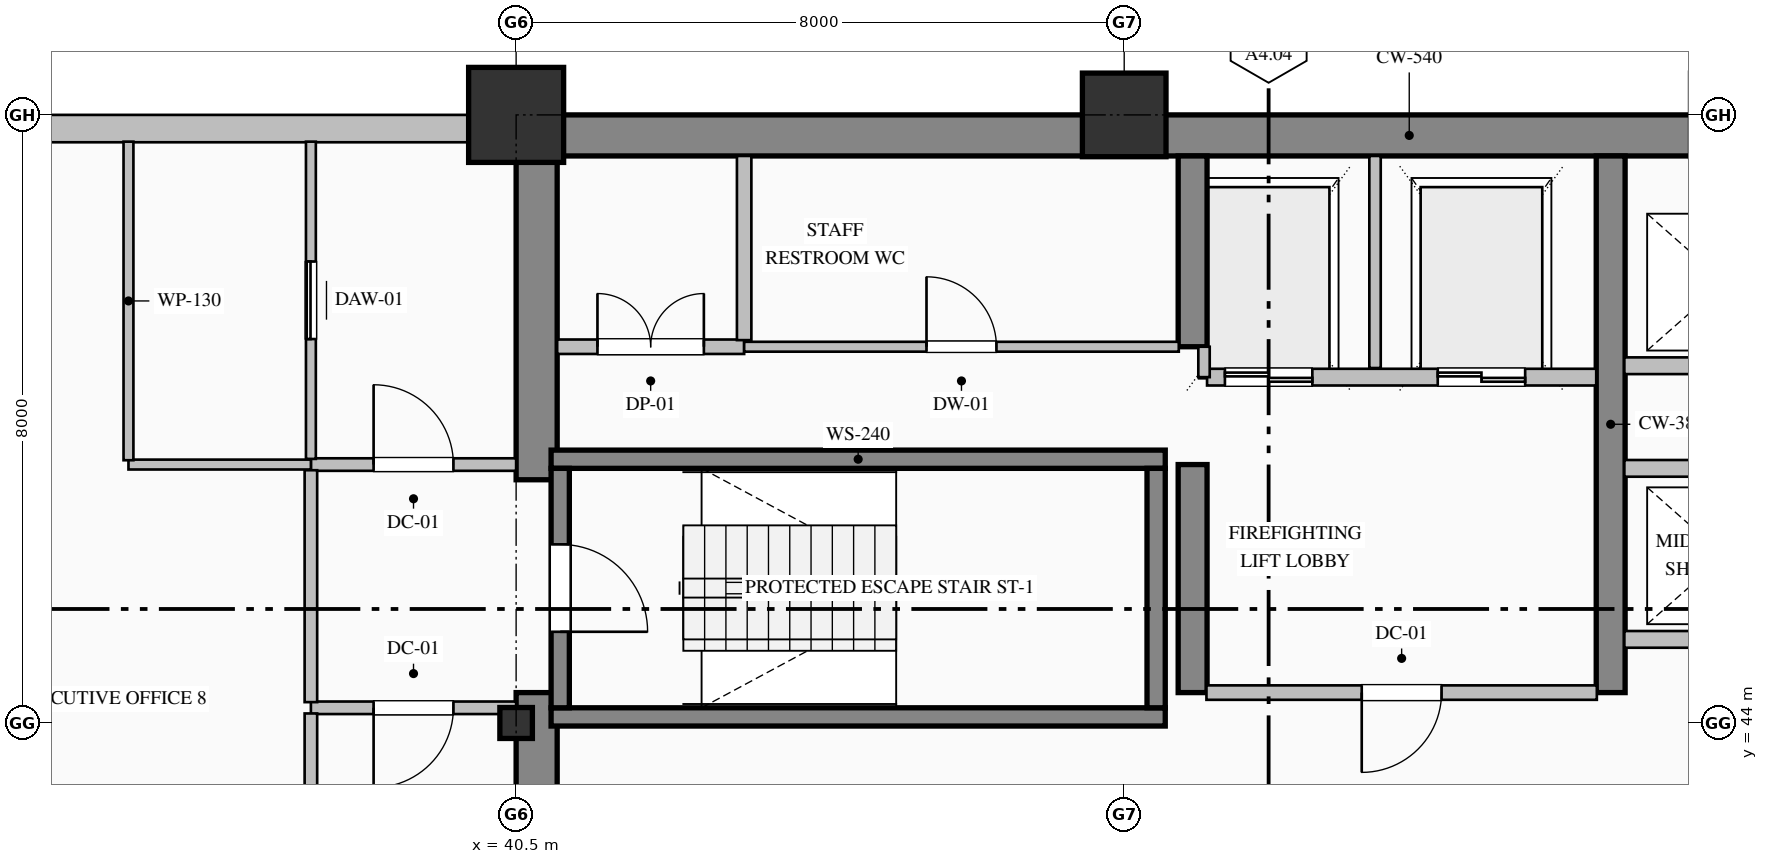
"""IFC4 building model, lengths in metres.
Left out: names, types, materials, properties, quantities, classifications, styles, units other than length and angle.
Written with IfcOpenShell. Run it as: python <this file> out.ifc"""

import sys

from ifc_helpers import new_model, si_unit, direction, frame, frame_2d, origin, origin_2d, place, context, subcontext, project, spatial, rectangle, hollow_rectangle, i_section, extrude, element, fill, save


model = new_model("IFC4")
c1 = context("Model", 3, precision=1e-05, world=origin(), true_north=direction((0.0, 1.0)))
c2 = subcontext(c1, "Body", "Model", "MODEL_VIEW")
j1 = project(units=[si_unit("LENGTHUNIT", "METRE"), si_unit("PLANEANGLEUNIT", "RADIAN")], contexts=[c1])
p1 = place(None, origin())
s1 = spatial("IfcSite", under=j1, at=p1, CompositionType="ELEMENT")
p2 = place(p1, origin())
s2 = spatial("IfcBuilding", under=s1, at=p2, CompositionType="ELEMENT")
p3 = place(p2, frame((0.0, 0.0, 32.2)))
s3 = spatial("IfcBuildingStorey", under=s2, at=p3, CompositionType="ELEMENT", Elevation=32.2)
p4 = place(p3, frame((40.5, 51.73, 0.0), z_axis=(0.0, 0.0, 1.0), x_axis=(1.0, 0.0, 0.0)))
e1 = element("IfcWall", 1, at=p4, inside=s3, PredefinedType="SHEAR", context=c2, shape_type="SweptSolid", body=[
    extrude(rectangle(XDim=23.5, YDim=0.54, at=frame_2d((11.75, 0.0))), origin(), (0.0, 0.0, 1.0), 3.75),
])
p5 = place(p3, frame((40.77, 36.54, 0.0), z_axis=(0.0, 0.0, 1.0), x_axis=(0.0, 1.0, 0.0)))
e2 = element("IfcWall", 2, at=p5, inside=s3, PredefinedType="SHEAR", context=c2, shape_type="SweptSolid", body=[
    extrude(rectangle(XDim=7.86, YDim=0.54, at=frame_2d((3.93, 0.0))), origin(), (0.0, 0.0, 1.0), 3.75),
])
p6 = place(p3, frame((40.77, 47.2, 0.0), z_axis=(0.0, 0.0, 1.0), x_axis=(0.0, 1.0, 0.0)))
e3 = element("IfcWall", 3, at=p6, inside=s3, PredefinedType="SHEAR", context=c2, shape_type="SweptSolid", body=[
    extrude(rectangle(XDim=4.26, YDim=0.54, at=frame_2d((2.13, 0.0))), origin(), (0.0, 0.0, 1.0), 3.75),
])
p7 = place(p3, frame((49.4, 44.4, 0.0), z_axis=(0.0, 0.0, 1.0), x_axis=(0.0, 1.0, 0.0)))
e4 = element("IfcWall", 4, at=p7, inside=s3, PredefinedType="SHEAR", context=c2, shape_type="SweptSolid", body=[
    extrude(rectangle(XDim=3.0, YDim=0.38, at=frame_2d((1.5, 0.0))), origin(), (0.0, 0.0, 1.0), 3.75),
])
p8 = place(p3, frame((49.4, 48.95, 0.0), z_axis=(0.0, 0.0, 1.0), x_axis=(0.0, 1.0, 0.0)))
e5 = element("IfcWall", 5, at=p8, inside=s3, PredefinedType="SHEAR", context=c2, shape_type="SweptSolid", body=[
    extrude(rectangle(XDim=2.51, YDim=0.38, at=frame_2d((1.255, 0.0))), origin(), (0.0, 0.0, 1.0), 3.75),
])
p9 = place(p3, frame((54.9, 44.4, 0.0), z_axis=(0.0, 0.0, 1.0), x_axis=(0.0, 1.0, 0.0)))
e6 = element("IfcWall", 6, at=p9, inside=s3, PredefinedType="SHEAR", context=c2, shape_type="SweptSolid", body=[
    extrude(rectangle(XDim=7.06, YDim=0.38, at=frame_2d((3.53, 0.0))), origin(), (0.0, 0.0, 1.0), 3.75),
])
p10 = place(p3, frame((40.5, 44.0, 0.0), z_axis=(0.0, 0.0, 1.0), x_axis=(1.0, 0.0, 0.0)))
e7 = element("IfcColumn", 7, at=p10, inside=s3, PredefinedType="COLUMN", context=c2, shape_type="SweptSolid", body=[
    extrude(i_section(OverallWidth=0.407, OverallDepth=0.428, WebThickness=0.02, FlangeThickness=0.035, FilletRadius=0.022, at=origin_2d()), origin(), (0.0, 0.0, 1.0), 4.0),
])
p11 = place(p3, frame((40.5, 52.0, 0.0), z_axis=(0.0, 0.0, 1.0), x_axis=(1.0, 0.0, 0.0)))
e8 = element("IfcColumn", 8, at=p11, inside=s3, PredefinedType="COLUMN", context=c2, shape_type="SweptSolid", body=[
    extrude(hollow_rectangle(XDim=1.25, YDim=1.25, WallThickness=0.045, at=origin_2d()), origin(), (0.0, 0.0, 1.0), 4.0),
])
p12 = place(p3, frame((48.5, 52.0, 0.0), z_axis=(0.0, 0.0, 1.0), x_axis=(1.0, 0.0, 0.0)))
e9 = element("IfcColumn", 9, at=p12, inside=s3, PredefinedType="COLUMN", context=c2, shape_type="SweptSolid", body=[
    extrude(hollow_rectangle(XDim=1.1, YDim=1.1, WallThickness=0.04, at=origin_2d()), origin(), (0.0, 0.0, 1.0), 4.0),
])
p13 = place(p3, frame((4.0, 51.82, 0.0), z_axis=(0.0, 0.0, 1.0), x_axis=(1.0, 0.0, 0.0)))
e10 = element("IfcWall", 10, at=p13, inside=s3, PredefinedType="SOLIDWALL", context=c2, shape_type="SweptSolid", body=[
    extrude(rectangle(XDim=36.52, YDim=0.36, at=frame_2d((18.26, 0.0))), origin(), (0.0, 0.0, 1.0), 3.25),
])
p14 = place(p13, frame((6.15, 0.0, 0.85)))
e11 = element("IfcOpeningElement", 11, at=p14, cuts=e10, PredefinedType="OPENING", context=c2, shape_type="SweptSolid", body=[
    extrude(rectangle(XDim=2.1, YDim=2.05, at=frame_2d((1.05, 1.025))), frame((0.0, 0.19, 0.0), z_axis=(0.0, -1.0, 0.0), x_axis=(1.0, 0.0, 0.0)), (0.0, 0.0, 1.0), 0.38),
])
p15 = place(p13, frame((13.5, 0.0, 0.85)))
e12 = element("IfcOpeningElement", 12, at=p15, cuts=e10, PredefinedType="OPENING", context=c2, shape_type="SweptSolid", body=[
    extrude(rectangle(XDim=1.8, YDim=2.05, at=frame_2d((0.9, 1.025))), frame((0.0, 0.19, 0.0), z_axis=(0.0, -1.0, 0.0), x_axis=(1.0, 0.0, 0.0)), (0.0, 0.0, 1.0), 0.38),
])
p16 = place(p13, frame((16.95, 0.0, 0.85)))
e13 = element("IfcOpeningElement", 13, at=p16, cuts=e10, PredefinedType="OPENING", context=c2, shape_type="SweptSolid", body=[
    extrude(rectangle(XDim=2.1, YDim=2.05, at=frame_2d((1.05, 1.025))), frame((0.0, 0.19, 0.0), z_axis=(0.0, -1.0, 0.0), x_axis=(1.0, 0.0, 0.0)), (0.0, 0.0, 1.0), 0.38),
])
p17 = place(p13, frame((24.3, 0.0, 0.85)))
e14 = element("IfcOpeningElement", 14, at=p17, cuts=e10, PredefinedType="OPENING", context=c2, shape_type="SweptSolid", body=[
    extrude(rectangle(XDim=1.8, YDim=2.05, at=frame_2d((0.9, 1.025))), frame((0.0, 0.19, 0.0), z_axis=(0.0, -1.0, 0.0), x_axis=(1.0, 0.0, 0.0)), (0.0, 0.0, 1.0), 0.38),
])
for number, where, z_axis, x_axis in (
    (15, (40.96, 47.47, 0.0), (0.0, 0.0, 1.0), (1.0, 0.0, 0.0)),
    (16, (49.04, 44.08, 0.0), (0.0, 0.0, 1.0), (-1.0, 0.0, 0.0)),
):
    element("IfcWall", number, at=place(p3, frame(where, z_axis=z_axis, x_axis=x_axis)), inside=s3, PredefinedType="SOLIDWALL", context=c2, shape_type="SweptSolid", body=[
        extrude(rectangle(XDim=8.08, YDim=0.24, at=frame_2d((4.04, 0.0))), origin(), (0.0, 0.0, 1.0), 4.0),
    ])
p18 = place(p3, frame((41.08, 47.35, 0.0), z_axis=(0.0, 0.0, 1.0), x_axis=(0.0, -1.0, 0.0)))
e17 = element("IfcWall", 17, at=p18, inside=s3, PredefinedType="SOLIDWALL", context=c2, shape_type="SweptSolid", body=[
    extrude(rectangle(XDim=3.15, YDim=0.24, at=frame_2d((1.575, 0.0))), origin(), (0.0, 0.0, 1.0), 4.0),
])
p19 = place(p18, frame((1.0, 0.0, 0.0)))
e18 = element("IfcOpeningElement", 18, at=p19, cuts=e17, PredefinedType="OPENING", context=c2, shape_type="SweptSolid", body=[
    extrude(rectangle(XDim=1.15, YDim=2.2, at=frame_2d((0.575, 1.1))), frame((0.0, 0.13, 0.0), z_axis=(0.0, -1.0, 0.0), x_axis=(1.0, 0.0, 0.0)), (0.0, 0.0, 1.0), 0.26),
])
p20 = place(p3, frame((48.92, 44.2, 0.0), z_axis=(0.0, 0.0, 1.0), x_axis=(0.0, 1.0, 0.0)))
e19 = element("IfcWall", 19, at=p20, inside=s3, PredefinedType="SOLIDWALL", context=c2, shape_type="SweptSolid", body=[
    extrude(rectangle(XDim=3.15, YDim=0.24, at=frame_2d((1.575, 0.0))), origin(), (0.0, 0.0, 1.0), 4.0),
])
p21 = place(p3, frame((54.71, 48.55, 0.0), z_axis=(0.0, 0.0, 1.0), x_axis=(-1.0, 0.0, 0.0)))
e20 = element("IfcWall", 20, at=p21, inside=s3, PredefinedType="PARTITIONING", context=c2, shape_type="SweptSolid", body=[
    extrude(rectangle(XDim=5.12, YDim=0.22, at=frame_2d((2.56, 0.0))), origin(), (0.0, 0.0, 1.0), 3.75),
])
p22 = place(p21, frame((3.735, 0.0, 0.0)))
e21 = element("IfcOpeningElement", 21, at=p22, cuts=e20, PredefinedType="OPENING", context=c2, shape_type="SweptSolid", body=[
    extrude(rectangle(XDim=1.15, YDim=2.2, at=frame_2d((0.575, 1.1))), frame((0.0, 0.12, 0.0), z_axis=(0.0, -1.0, 0.0), x_axis=(1.0, 0.0, 0.0)), (0.0, 0.0, 1.0), 0.24),
])
p23 = place(p21, frame((0.935, 0.0, 0.0)))
e22 = element("IfcOpeningElement", 22, at=p23, cuts=e20, PredefinedType="OPENING", context=c2, shape_type="SweptSolid", body=[
    extrude(rectangle(XDim=1.15, YDim=2.2, at=frame_2d((0.575, 1.1))), frame((0.0, 0.12, 0.0), z_axis=(0.0, -1.0, 0.0), x_axis=(1.0, 0.0, 0.0)), (0.0, 0.0, 1.0), 0.24),
])
p24 = place(p3, frame((51.8, 48.67, 0.0), z_axis=(0.0, 0.0, 1.0), x_axis=(0.0, 1.0, 0.0)))
e23 = element("IfcWall", 23, at=p24, inside=s3, PredefinedType="PARTITIONING", context=c2, shape_type="SweptSolid", body=[
    extrude(rectangle(XDim=2.79, YDim=0.15, at=frame_2d((1.395, 0.0))), origin(), (0.0, 0.0, 1.0), 3.75),
])
p25 = place(p3, frame((49.55, 48.55, 0.0), z_axis=(0.0, 0.0, 1.0), x_axis=(0.0, 1.0, 0.0)))
e24 = element("IfcWall", 24, at=p25, inside=s3, PredefinedType="PARTITIONING", context=c2, shape_type="SweptSolid", body=[
    extrude(rectangle(XDim=0.4, YDim=0.15, at=frame_2d((0.2, 0.0))), origin(), (0.0, 0.0, 1.0), 3.75),
])
for number, where, z_axis, x_axis in (
    (25, (63.32, 45.1, 0.0), (0.0, 0.0, 1.0), (-1.0, 0.0, 0.0)),
    (26, (55.08, 47.35, 0.0), (0.0, 0.0, 1.0), (1.0, 0.0, 0.0)),
    (27, (63.32, 48.7, 0.0), (0.0, 0.0, 1.0), (-1.0, 0.0, 0.0)),
):
    element("IfcWall", number, at=place(p3, frame(where, z_axis=z_axis, x_axis=x_axis)), inside=s3, PredefinedType="PARTITIONING", context=c2, shape_type="SweptSolid", body=[
        extrude(rectangle(XDim=8.24, YDim=0.22, at=frame_2d((4.12, 0.0))), origin(), (0.0, 0.0, 1.0), 3.75),
    ])
p26 = place(p3, frame((37.8, 47.4, 0.0), z_axis=(0.0, 0.0, 1.0), x_axis=(1.0, 0.0, 0.0)))
e28 = element("IfcWall", 28, at=p26, inside=s3, PredefinedType="PARTITIONING", context=c2, shape_type="SweptSolid", body=[
    extrude(rectangle(XDim=2.7, YDim=0.165, at=frame_2d((1.35, 0.0))), origin(), (0.0, 0.0, 1.0), 3.75),
])
p27 = place(p26, frame((0.825, 0.0, 0.0)))
e29 = element("IfcOpeningElement", 29, at=p27, cuts=e28, PredefinedType="OPENING", context=c2, shape_type="SweptSolid", body=[
    extrude(rectangle(XDim=1.05, YDim=2.15, at=frame_2d((0.525, 1.075))), frame((0.0, 0.093, 0.0), z_axis=(0.0, -1.0, 0.0), x_axis=(1.0, 0.0, 0.0)), (0.0, 0.0, 1.0), 0.185),
])
p28 = place(p3, frame((40.5, 44.2, 0.0), z_axis=(0.0, 0.0, 1.0), x_axis=(-1.0, 0.0, 0.0)))
e30 = element("IfcWall", 30, at=p28, inside=s3, PredefinedType="PARTITIONING", context=c2, shape_type="SweptSolid", body=[
    extrude(rectangle(XDim=2.7, YDim=0.165, at=frame_2d((1.35, 0.0))), origin(), (0.0, 0.0, 1.0), 3.75),
])
p29 = place(p28, frame((0.825, 0.0, 0.0)))
e31 = element("IfcOpeningElement", 31, at=p29, cuts=e30, PredefinedType="OPENING", context=c2, shape_type="SweptSolid", body=[
    extrude(rectangle(XDim=1.05, YDim=2.15, at=frame_2d((0.525, 1.075))), frame((0.0, 0.093, 0.0), z_axis=(0.0, -1.0, 0.0), x_axis=(1.0, 0.0, 0.0)), (0.0, 0.0, 1.0), 0.185),
])
p30 = place(p3, frame((37.8, 44.274, 0.0), z_axis=(0.0, 0.0, 1.0), x_axis=(0.0, 1.0, 0.0)))
e32 = element("IfcWall", 32, at=p30, inside=s3, PredefinedType="PARTITIONING", context=c2, shape_type="SweptSolid", body=[
    extrude(rectangle(XDim=3.051, YDim=0.165, at=frame_2d((1.525, 0.0))), origin(), (0.0, 0.0, 1.0), 3.75),
])
p31 = place(p3, frame((37.8, 47.475, 0.0), z_axis=(0.0, 0.0, 1.0), x_axis=(0.0, 1.0, 0.0)))
e33 = element("IfcWall", 33, at=p31, inside=s3, PredefinedType="PARTITIONING", context=c2, shape_type="SweptSolid", body=[
    extrude(rectangle(XDim=4.173, YDim=0.13, at=frame_2d((2.087, 0.0))), origin(), (0.0, 0.0, 1.0), 3.75),
])
p32 = place(p31, frame((1.577, 0.0, 0.0)))
e34 = element("IfcOpeningElement", 34, at=p32, cuts=e33, PredefinedType="OPENING", context=c2, shape_type="SweptSolid", body=[
    extrude(rectangle(XDim=1.02, YDim=2.15, at=frame_2d((0.51, 1.075))), frame((0.0, 0.075, 0.0), z_axis=(0.0, -1.0, 0.0), x_axis=(1.0, 0.0, 0.0)), (0.0, 0.0, 1.0), 0.15),
])
p33 = place(p3, frame((37.8, 47.4, 0.0), z_axis=(0.0, 0.0, 1.0), x_axis=(-1.0, 0.0, 0.0)))
e35 = element("IfcWall", 35, at=p33, inside=s3, PredefinedType="PARTITIONING", context=c2, shape_type="SweptSolid", body=[
    extrude(rectangle(XDim=2.4, YDim=0.13, at=frame_2d((1.2, 0.0))), origin(), (0.0, 0.0, 1.0), 3.75),
])
p34 = place(p3, frame((35.4, 47.457, 0.0), z_axis=(0.0, 0.0, 1.0), x_axis=(0.0, 1.0, 0.0)))
e36 = element("IfcWall", 36, at=p34, inside=s3, PredefinedType="PARTITIONING", context=c2, shape_type="SweptSolid", body=[
    extrude(rectangle(XDim=4.191, YDim=0.13, at=frame_2d((2.095, 0.0))), origin(), (0.0, 0.0, 1.0), 3.75),
])
p35 = place(p3, frame((41.04, 48.95, 0.0), z_axis=(0.0, 0.0, 1.0), x_axis=(1.0, 0.0, 0.0)))
e37 = element("IfcWall", 37, at=p35, inside=s3, PredefinedType="PARTITIONING", context=c2, shape_type="SweptSolid", body=[
    extrude(rectangle(XDim=2.46, YDim=0.19, at=frame_2d((1.23, 0.0))), origin(), (0.0, 0.0, 1.0), 3.75),
])
p36 = place(p35, frame((0.53, 0.0, 0.0)))
e38 = element("IfcOpeningElement", 38, at=p36, cuts=e37, PredefinedType="OPENING", context=c2, shape_type="SweptSolid", body=[
    extrude(rectangle(XDim=1.4, YDim=2.25, at=frame_2d((0.7, 1.125))), frame((0.0, 0.105, 0.0), z_axis=(0.0, -1.0, 0.0), x_axis=(1.0, 0.0, 0.0)), (0.0, 0.0, 1.0), 0.21),
])
p37 = place(p3, frame((43.5, 48.95, 0.0), z_axis=(0.0, 0.0, 1.0), x_axis=(1.0, 0.0, 0.0)))
e39 = element("IfcWall", 39, at=p37, inside=s3, PredefinedType="PARTITIONING", context=c2, shape_type="SweptSolid", body=[
    extrude(rectangle(XDim=5.718, YDim=0.13, at=frame_2d((2.859, 0.0))), origin(), (0.0, 0.0, 1.0), 3.75),
])
p38 = place(p37, frame((2.399, 0.0, 0.0)))
e40 = element("IfcOpeningElement", 40, at=p38, cuts=e39, PredefinedType="OPENING", context=c2, shape_type="SweptSolid", body=[
    extrude(rectangle(XDim=0.92, YDim=2.15, at=frame_2d((0.46, 1.075))), frame((0.0, 0.075, 0.0), z_axis=(0.0, -1.0, 0.0), x_axis=(1.0, 0.0, 0.0)), (0.0, 0.0, 1.0), 0.15),
])
p39 = place(p3, frame((54.718, 44.4, 0.0), z_axis=(0.0, 0.0, 1.0), x_axis=(-1.0, 0.0, 0.0)))
e41 = element("IfcWall", 41, at=p39, inside=s3, PredefinedType="PARTITIONING", context=c2, shape_type="SweptSolid", body=[
    extrude(rectangle(XDim=5.136, YDim=0.19, at=frame_2d((2.568, 0.0))), origin(), (0.0, 0.0, 1.0), 3.75),
])
p40 = place(p39, frame((2.043, 0.0, 0.0)))
e42 = element("IfcOpeningElement", 42, at=p40, cuts=e41, PredefinedType="OPENING", context=c2, shape_type="SweptSolid", body=[
    extrude(rectangle(XDim=1.05, YDim=2.15, at=frame_2d((0.525, 1.075))), frame((0.0, 0.105, 0.0), z_axis=(0.0, -1.0, 0.0), x_axis=(1.0, 0.0, 0.0)), (0.0, 0.0, 1.0), 0.21),
])
p41 = place(p3, frame((43.5, 51.46, 0.0), z_axis=(0.0, 0.0, 1.0), x_axis=(0.0, -1.0, 0.0)))
e43 = element("IfcWall", 43, at=p41, inside=s3, PredefinedType="PARTITIONING", context=c2, shape_type="SweptSolid", body=[
    extrude(rectangle(XDim=2.423, YDim=0.19, at=frame_2d((1.211, 0.0))), origin(), (0.0, 0.0, 1.0), 3.75),
])
p42 = place(p3, frame((37.8, 40.475, 0.0), z_axis=(0.0, 0.0, 1.0), x_axis=(0.0, 1.0, 0.0)))
e44 = element("IfcWall", 44, at=p42, inside=s3, PredefinedType="PARTITIONING", context=c2, shape_type="SweptSolid", body=[
    extrude(rectangle(XDim=3.651, YDim=0.165, at=frame_2d((1.825, 0.0))), origin(), (0.0, 0.0, 1.0), 3.75),
])
p43 = place(p19, origin())
e45 = element("IfcDoor", 45, at=p43, inside=s3, OperationType="SINGLE_SWING_RIGHT", PredefinedType="DOOR", context=c2, shape_type="SweptSolid", body=[
    extrude(rectangle(XDim=1.15, YDim=2.2, at=frame_2d((0.575, 1.1))), frame((0.0, 0.025, 0.0), z_axis=(0.0, -1.0, 0.0), x_axis=(1.0, 0.0, 0.0)), (0.0, 0.0, 1.0), 0.05),
])
fill(e18, e45)
p44 = place(p22, origin())
e46 = element("IfcDoor", 46, at=p44, inside=s3, OperationType="DOUBLE_DOOR_SLIDING", PredefinedType="DOOR", context=c2, shape_type="SweptSolid", body=[
    extrude(rectangle(XDim=1.15, YDim=2.2, at=frame_2d((0.575, 1.1))), frame((0.0, 0.025, 0.0), z_axis=(0.0, -1.0, 0.0), x_axis=(1.0, 0.0, 0.0)), (0.0, 0.0, 1.0), 0.05),
])
fill(e21, e46)
p45 = place(p23, origin())
e47 = element("IfcDoor", 47, at=p45, inside=s3, OperationType="DOUBLE_DOOR_SLIDING", PredefinedType="DOOR", context=c2, shape_type="SweptSolid", body=[
    extrude(rectangle(XDim=1.15, YDim=2.2, at=frame_2d((0.575, 1.1))), frame((0.0, 0.025, 0.0), z_axis=(0.0, -1.0, 0.0), x_axis=(1.0, 0.0, 0.0)), (0.0, 0.0, 1.0), 0.05),
])
fill(e22, e47)
p46 = place(p40, origin())
e48 = element("IfcDoor", 48, at=p46, inside=s3, OperationType="SINGLE_SWING_RIGHT", PredefinedType="DOOR", context=c2, shape_type="SweptSolid", body=[
    extrude(rectangle(XDim=1.05, YDim=2.15, at=frame_2d((0.525, 1.075))), frame((0.0, 0.025, 0.0), z_axis=(0.0, -1.0, 0.0), x_axis=(1.0, 0.0, 0.0)), (0.0, 0.0, 1.0), 0.05),
])
fill(e42, e48)
p47 = place(p27, origin())
e49 = element("IfcDoor", 49, at=p47, inside=s3, OperationType="SINGLE_SWING_LEFT", PredefinedType="DOOR", context=c2, shape_type="SweptSolid", body=[
    extrude(rectangle(XDim=1.05, YDim=2.15, at=frame_2d((0.525, 1.075))), frame((0.0, 0.025, 0.0), z_axis=(0.0, -1.0, 0.0), x_axis=(1.0, 0.0, 0.0)), (0.0, 0.0, 1.0), 0.05),
])
fill(e29, e49)
p48 = place(p29, origin())
e50 = element("IfcDoor", 50, at=p48, inside=s3, OperationType="SINGLE_SWING_RIGHT", PredefinedType="DOOR", context=c2, shape_type="SweptSolid", body=[
    extrude(rectangle(XDim=1.05, YDim=2.15, at=frame_2d((0.525, 1.075))), frame((0.0, 0.025, 0.0), z_axis=(0.0, -1.0, 0.0), x_axis=(1.0, 0.0, 0.0)), (0.0, 0.0, 1.0), 0.05),
])
fill(e31, e50)
p49 = place(p32, origin())
e51 = element("IfcDoor", 51, at=p49, inside=s3, OperationType="SLIDING_TO_LEFT", PredefinedType="DOOR", context=c2, shape_type="SweptSolid", body=[
    extrude(rectangle(XDim=1.02, YDim=2.15, at=frame_2d((0.51, 1.075))), frame((0.0, 0.025, 0.0), z_axis=(0.0, -1.0, 0.0), x_axis=(1.0, 0.0, 0.0)), (0.0, 0.0, 1.0), 0.05),
])
fill(e34, e51)
p50 = place(p36, origin())
e52 = element("IfcDoor", 52, at=p50, inside=s3, OperationType="DOUBLE_DOOR_SINGLE_SWING", PredefinedType="DOOR", context=c2, shape_type="SweptSolid", body=[
    extrude(rectangle(XDim=1.4, YDim=2.25, at=frame_2d((0.7, 1.125))), frame((0.0, 0.025, 0.0), z_axis=(0.0, -1.0, 0.0), x_axis=(1.0, 0.0, 0.0)), (0.0, 0.0, 1.0), 0.05),
])
fill(e38, e52)
p51 = place(p38, origin())
e53 = element("IfcDoor", 53, at=p51, inside=s3, OperationType="SINGLE_SWING_LEFT", PredefinedType="DOOR", context=c2, shape_type="SweptSolid", body=[
    extrude(rectangle(XDim=0.92, YDim=2.15, at=frame_2d((0.46, 1.075))), frame((0.0, 0.025, 0.0), z_axis=(0.0, -1.0, 0.0), x_axis=(1.0, 0.0, 0.0)), (0.0, 0.0, 1.0), 0.05),
])
fill(e40, e53)
save(model, sys.argv[1])
